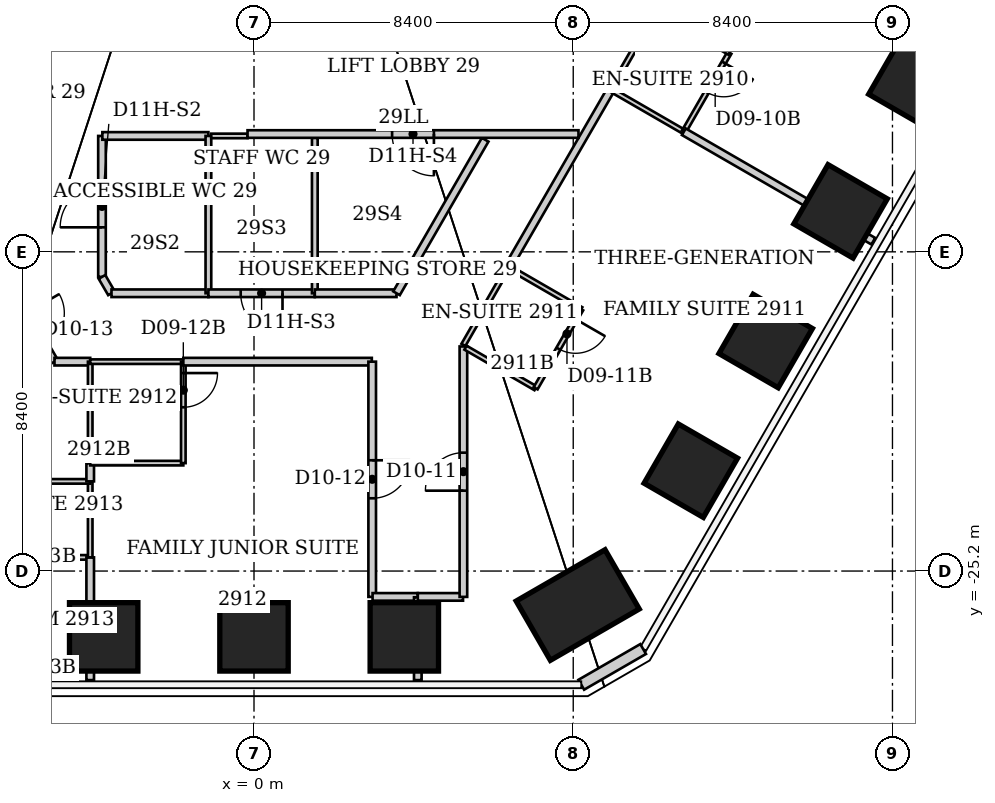
"""IFC4 building model, lengths in metres.
Left out: names, types, materials, properties, quantities, classifications, styles, units other than length and angle.
Written with IfcOpenShell. Run it as: python <this file> out.ifc"""

import sys

from ifc_helpers import new_model, si_unit, direction, frame, frame_2d, origin, origin_2d, place, context, subcontext, project, spatial, rectangle, extrude, element, fill, save


model = new_model("IFC4")
c1 = context("Model", 3, precision=1e-05, world=origin(), true_north=direction((0.0, 1.0)))
c2 = subcontext(c1, "Body", "Model", "MODEL_VIEW")
j1 = project(units=[si_unit("LENGTHUNIT", "METRE"), si_unit("PLANEANGLEUNIT", "RADIAN")], contexts=[c1])
p1 = place(None, origin())
s1 = spatial("IfcSite", under=j1, at=p1, CompositionType="ELEMENT")
p2 = place(p1, origin())
s2 = spatial("IfcBuilding", under=s1, at=p2, CompositionType="ELEMENT")
p3 = place(p2, frame((0.0, 0.0, 119.6)))
s3 = spatial("IfcBuildingStorey", under=s2, at=p3, CompositionType="ELEMENT", Elevation=119.6)
for number, where, z_axis, x_axis in (
    (1, (17.404, -12.323, 0.0), (0.0, 0.0, 1.0), (0.866, -0.5, 0.0)),
    (2, (15.434, -15.735, 0.0), (0.0, 0.0, 1.0), (0.866, -0.5, 0.0)),
    (3, (13.464, -19.147, 0.0), (0.0, 0.0, 1.0), (0.866, -0.5, 0.0)),
    (4, (11.494, -22.559, 0.0), (0.0, 0.0, 1.0), (0.866, -0.5, 0.0)),
):
    element("IfcColumn", number, at=place(p3, frame(where, z_axis=z_axis, x_axis=x_axis)), inside=s3, PredefinedType="COLUMN", context=c2, shape_type="SweptSolid", body=[
        extrude(rectangle(XDim=1.8, YDim=1.8, at=origin_2d()), origin(), (0.0, 0.0, 1.0), 3.8),
    ])
p4 = place(p3, frame((8.518, -26.094, 0.0), z_axis=(0.0, 0.0, 1.0), x_axis=(0.5, -0.866025403784, 0.0)))
e5 = element("IfcColumn", 5, at=p4, inside=s3, PredefinedType="COLUMN", context=c2, shape_type="SweptSolid", body=[
    extrude(rectangle(XDim=1.8, YDim=2.7, at=origin_2d()), origin(), (0.0, 0.0, 1.0), 3.8),
])
for number, where, z_axis, x_axis in (
    (6, (3.955, -26.932, 0.0), (0.0, 0.0, 1.0), (0.0, -1.0, 0.0)),
    (7, (0.0, -26.932, 0.0), (0.0, 0.0, 1.0), (0.0, -1.0, 0.0)),
    (8, (-3.955, -26.932, 0.0), (0.0, 0.0, 1.0), (0.0, -1.0, 0.0)),
):
    element("IfcColumn", number, at=place(p3, frame(where, z_axis=z_axis, x_axis=x_axis)), inside=s3, PredefinedType="COLUMN", context=c2, shape_type="SweptSolid", body=[
        extrude(rectangle(XDim=1.8, YDim=1.8, at=origin_2d()), origin(), (0.0, 0.0, 1.0), 3.8),
    ])
p5 = place(p3, frame((10.24, -27.252, 0.0), z_axis=(0.0, 0.0, 1.0), x_axis=(-0.866045024864, -0.499966013754, 0.0)))
e9 = element("IfcWall", 9, at=p5, inside=s3, PredefinedType="SOLIDWALL", context=c2, shape_type="SweptSolid", body=[
    extrude(rectangle(XDim=1.88, YDim=0.3, at=frame_2d((0.94, 0.0))), origin(), (0.0, 0.0, 1.0), 3.64),
])
p6 = place(p3, frame((-6.71, -24.84, 0.0), z_axis=(0.0, 0.0, 1.0), x_axis=(1.0, 0.0, 0.0)))
e10 = element("IfcWall", 10, at=p6, inside=s3, PredefinedType="PARTITIONING", context=c2, shape_type="SweptSolid", body=[
    extrude(rectangle(XDim=2.4, YDim=0.12, at=frame_2d((1.2, 0.0))), origin(), (0.0, 0.0, 1.0), 3.64),
])
p7 = place(p6, frame((0.45, 0.0, 0.0)))
e11 = element("IfcOpeningElement", 11, at=p7, cuts=e10, PredefinedType="OPENING", context=c2, shape_type="SweptSolid", body=[
    extrude(rectangle(XDim=0.9, YDim=2.03, at=frame_2d((0.45, 1.015))), frame((0.0, 0.06, 0.0), z_axis=(0.0, -1.0, 0.0), x_axis=(1.0, 0.0, 0.0)), (0.0, 0.0, 1.0), 0.12),
])
p8 = place(p3, frame((-6.23, -18.0, 0.0), z_axis=(0.0, 0.0, 1.0), x_axis=(0.501647016168, -0.86507240805, 0.0)))
e12 = element("IfcWall", 12, at=p8, inside=s3, PredefinedType="PARTITIONING", context=c2, shape_type="SweptSolid", body=[
    extrude(rectangle(XDim=1.954, YDim=0.2, at=frame_2d((0.977, 0.0))), origin(), (0.0, 0.0, 1.0), 3.64),
])
p9 = place(p8, frame((0.477, 0.0, 0.0)))
e13 = element("IfcOpeningElement", 13, at=p9, cuts=e12, PredefinedType="OPENING", context=c2, shape_type="SweptSolid", body=[
    extrude(rectangle(XDim=1.0, YDim=2.13, at=frame_2d((0.5, 1.065))), frame((0.0, 0.1, 0.0), z_axis=(0.0, -1.0, 0.0), x_axis=(1.0, 0.0, 0.0)), (0.0, 0.0, 1.0), 0.2),
])
p10 = place(p3, frame((-5.25, -19.69, 0.0), z_axis=(0.0, 0.0, 1.0), x_axis=(1.0, 0.0, 0.0)))
e14 = element("IfcWall", 14, at=p10, inside=s3, PredefinedType="PARTITIONING", context=c2, shape_type="SweptSolid", body=[
    extrude(rectangle(XDim=0.94, YDim=0.2, at=frame_2d((0.47, 0.0))), origin(), (0.0, 0.0, 1.0), 3.64),
])
p11 = place(p3, frame((-4.31, -28.07, 0.0), z_axis=(0.0, 0.0, 1.0), x_axis=(0.0, 1.0, 0.0)))
e15 = element("IfcWall", 15, at=p11, inside=s3, PredefinedType="PARTITIONING", context=c2, shape_type="SweptSolid", body=[
    extrude(rectangle(XDim=3.23, YDim=0.2, at=frame_2d((1.615, 0.0))), origin(), (0.0, 0.0, 1.0), 3.64),
])
p12 = place(p3, frame((-4.31, -24.84, 0.0), z_axis=(0.0, 0.0, 1.0), x_axis=(0.0, 1.0, 0.0)))
e16 = element("IfcWall", 16, at=p12, inside=s3, PredefinedType="PARTITIONING", context=c2, shape_type="SweptSolid", body=[
    extrude(rectangle(XDim=2.0, YDim=0.12, at=frame_2d((1.0, 0.0))), origin(), (0.0, 0.0, 1.0), 3.64),
])
p13 = place(p3, frame((-4.31, -22.84, 0.0), z_axis=(0.0, 0.0, 1.0), x_axis=(-1.0, 0.0, 0.0)))
e17 = element("IfcWall", 17, at=p13, inside=s3, PredefinedType="PARTITIONING", context=c2, shape_type="SweptSolid", body=[
    extrude(rectangle(XDim=2.4, YDim=0.12, at=frame_2d((1.2, 0.0))), origin(), (0.0, 0.0, 1.0), 3.64),
])
p14 = place(p3, frame((-4.31, -22.84, 0.0), z_axis=(0.0, 0.0, 1.0), x_axis=(0.0, 1.0, 0.0)))
e18 = element("IfcWall", 18, at=p14, inside=s3, PredefinedType="PARTITIONING", context=c2, shape_type="SweptSolid", body=[
    extrude(rectangle(XDim=0.48, YDim=0.2, at=frame_2d((0.24, 0.0))), origin(), (0.0, 0.0, 1.0), 3.64),
])
p15 = place(p3, frame((-4.31, -22.36, 0.0), z_axis=(0.0, 0.0, 1.0), x_axis=(0.0, 1.0, 0.0)))
e19 = element("IfcWall", 19, at=p15, inside=s3, PredefinedType="PARTITIONING", context=c2, shape_type="SweptSolid", body=[
    extrude(rectangle(XDim=2.67, YDim=0.12, at=frame_2d((1.335, 0.0))), origin(), (0.0, 0.0, 1.0), 3.64),
])
for number, where, z_axis, x_axis in (
    (20, (-4.31, -22.36, 0.0), (0.0, 0.0, 1.0), (1.0, 0.0, 0.0)),
    (21, (-4.31, -19.69, 0.0), (0.0, 0.0, 1.0), (1.0, 0.0, 0.0)),
):
    element("IfcWall", number, at=place(p3, frame(where, z_axis=z_axis, x_axis=x_axis)), inside=s3, PredefinedType="PARTITIONING", context=c2, shape_type="SweptSolid", body=[
        extrude(rectangle(XDim=2.45, YDim=0.12, at=frame_2d((1.225, 0.0))), origin(), (0.0, 0.0, 1.0), 3.64),
    ])
p16 = place(p3, frame((-4.0, -17.46, 0.0), z_axis=(0.0, 0.0, 1.0), x_axis=(0.0, 1.0, 0.0)))
e22 = element("IfcWall", 22, at=p16, inside=s3, PredefinedType="PARTITIONING", context=c2, shape_type="SweptSolid", body=[
    extrude(rectangle(XDim=3.71, YDim=0.2, at=frame_2d((1.855, 0.0))), origin(), (0.0, 0.0, 1.0), 2.878),
])
p17 = place(p16, frame((1.305, 0.0, 0.0)))
e23 = element("IfcOpeningElement", 23, at=p17, cuts=e22, PredefinedType="OPENING", context=c2, shape_type="SweptSolid", body=[
    extrude(rectangle(XDim=1.1, YDim=2.2, at=frame_2d((0.55, 1.1))), frame((0.0, 0.1, 0.0), z_axis=(0.0, -1.0, 0.0), x_axis=(1.0, 0.0, 0.0)), (0.0, 0.0, 1.0), 0.2),
])
p18 = place(p3, frame((-3.99, -13.75, 0.0), z_axis=(0.0, 0.0, 1.0), x_axis=(1.0, 0.0, 0.0)))
e24 = element("IfcWall", 24, at=p18, inside=s3, PredefinedType="PARTITIONING", context=c2, shape_type="SweptSolid", body=[
    extrude(rectangle(XDim=2.79, YDim=0.2, at=frame_2d((1.395, 0.0))), origin(), (0.0, 0.0, 1.0), 3.64),
])
p19 = place(p3, frame((-3.75, -17.89, 0.0), z_axis=(0.0, 0.0, 1.0), x_axis=(-0.502680181512, 0.864472460588, 0.0)))
e25 = element("IfcWall", 25, at=p19, inside=s3, PredefinedType="PARTITIONING", context=c2, shape_type="SweptSolid", body=[
    extrude(rectangle(XDim=0.497, YDim=0.2, at=frame_2d((0.249, 0.0))), origin(), (0.0, 0.0, 1.0), 3.64),
])
p20 = place(p3, frame((-1.86, -22.36, 0.0), z_axis=(0.0, 0.0, 1.0), x_axis=(0.0, 1.0, 0.0)))
e26 = element("IfcWall", 26, at=p20, inside=s3, PredefinedType="PARTITIONING", context=c2, shape_type="SweptSolid", body=[
    extrude(rectangle(XDim=2.67, YDim=0.12, at=frame_2d((1.335, 0.0))), origin(), (0.0, 0.0, 1.0), 2.86),
])
p21 = place(p20, frame((1.47, 0.0, 0.0)))
e27 = element("IfcOpeningElement", 27, at=p21, cuts=e26, PredefinedType="OPENING", context=c2, shape_type="SweptSolid", body=[
    extrude(rectangle(XDim=0.9, YDim=2.03, at=frame_2d((0.45, 1.015))), frame((0.0, 0.06, 0.0), z_axis=(0.0, -1.0, 0.0), x_axis=(1.0, 0.0, 0.0)), (0.0, 0.0, 1.0), 0.12),
])
p22 = place(p3, frame((-1.86, -19.69, 0.0), z_axis=(0.0, 0.0, 1.0), x_axis=(1.0, 0.0, 0.0)))
e28 = element("IfcWall", 28, at=p22, inside=s3, PredefinedType="PARTITIONING", context=c2, shape_type="SweptSolid", body=[
    extrude(rectangle(XDim=4.96, YDim=0.2, at=frame_2d((2.48, 0.0))), origin(), (0.0, 0.0, 1.0), 3.64),
])
p23 = place(p3, frame((-1.2, -17.89, 0.0), z_axis=(0.0, 0.0, 1.0), x_axis=(-1.0, 0.0, 0.0)))
e29 = element("IfcWall", 29, at=p23, inside=s3, PredefinedType="PARTITIONING", context=c2, shape_type="SweptSolid", body=[
    extrude(rectangle(XDim=2.55, YDim=0.2, at=frame_2d((1.275, 0.0))), origin(), (0.0, 0.0, 1.0), 3.64),
])
p24 = place(p3, frame((-1.2, -13.75, 0.0), z_axis=(0.0, 0.0, 1.0), x_axis=(0.0, -1.0, 0.0)))
e30 = element("IfcWall", 30, at=p24, inside=s3, PredefinedType="PARTITIONING", context=c2, shape_type="SweptSolid", body=[
    extrude(rectangle(XDim=4.14, YDim=0.15, at=frame_2d((2.07, 0.0))), origin(), (0.0, 0.0, 1.0), 3.64),
])
p25 = place(p3, frame((-1.125, -13.75, 0.0), z_axis=(0.0, 0.0, 1.0), x_axis=(1.0, 0.0, 0.0)))
e31 = element("IfcWall", 31, at=p25, inside=s3, PredefinedType="PARTITIONING", context=c2, shape_type="SweptSolid", body=[
    extrude(rectangle(XDim=0.955, YDim=0.12, at=frame_2d((0.478, 0.0))), origin(), (0.0, 0.0, 1.0), 3.64),
])
p26 = place(p3, frame((1.6, -17.89, 0.0), z_axis=(0.0, 0.0, 1.0), x_axis=(-1.0, 0.0, 0.0)))
e32 = element("IfcWall", 32, at=p26, inside=s3, PredefinedType="PARTITIONING", context=c2, shape_type="SweptSolid", body=[
    extrude(rectangle(XDim=2.8, YDim=0.2, at=frame_2d((1.4, 0.0))), origin(), (0.0, 0.0, 1.0), 3.64),
])
p27 = place(p26, frame((0.85, 0.0, 0.0)))
e33 = element("IfcOpeningElement", 33, at=p27, cuts=e32, PredefinedType="OPENING", context=c2, shape_type="SweptSolid", body=[
    extrude(rectangle(XDim=1.1, YDim=2.2, at=frame_2d((0.55, 1.1))), frame((0.0, 0.1, 0.0), z_axis=(0.0, -1.0, 0.0), x_axis=(1.0, 0.0, 0.0)), (0.0, 0.0, 1.0), 0.2),
])
p28 = place(p3, frame((1.6, -13.8, 0.0), z_axis=(0.0, 0.0, 1.0), x_axis=(0.0, -1.0, 0.0)))
e34 = element("IfcWall", 34, at=p28, inside=s3, PredefinedType="PARTITIONING", context=c2, shape_type="SweptSolid", body=[
    extrude(rectangle(XDim=4.09, YDim=0.15, at=frame_2d((2.045, 0.0))), origin(), (0.0, 0.0, 1.0), 3.64),
])
p29 = place(p3, frame((3.11, -19.69, 0.0), z_axis=(0.0, 0.0, 1.0), x_axis=(0.0, -1.0, 0.0)))
e35 = element("IfcWall", 35, at=p29, inside=s3, PredefinedType="PARTITIONING", context=c2, shape_type="SweptSolid", body=[
    extrude(rectangle(XDim=6.19, YDim=0.2, at=frame_2d((3.095, 0.0))), origin(), (0.0, 0.0, 1.0), 3.64),
])
p30 = place(p29, frame((2.595, 0.0, 0.0)))
e36 = element("IfcOpeningElement", 36, at=p30, cuts=e35, PredefinedType="OPENING", context=c2, shape_type="SweptSolid", body=[
    extrude(rectangle(XDim=1.0, YDim=2.13, at=frame_2d((0.5, 1.065))), frame((0.0, 0.1, 0.0), z_axis=(0.0, -1.0, 0.0), x_axis=(1.0, 0.0, 0.0)), (0.0, 0.0, 1.0), 0.2),
])
p31 = place(p3, frame((3.12, -25.88, 0.0), z_axis=(0.0, 0.0, 1.0), x_axis=(1.0, 0.0, 0.0)))
e37 = element("IfcWall", 37, at=p31, inside=s3, PredefinedType="PARTITIONING", context=c2, shape_type="SweptSolid", body=[
    extrude(rectangle(XDim=1.19, YDim=0.2, at=frame_2d((0.595, 0.0))), origin(), (0.0, 0.0, 1.0), 3.64),
])
p32 = place(p3, frame((3.75, -17.89, 0.0), z_axis=(0.0, 0.0, 1.0), x_axis=(-1.0, 0.0, 0.0)))
e38 = element("IfcWall", 38, at=p32, inside=s3, PredefinedType="PARTITIONING", context=c2, shape_type="SweptSolid", body=[
    extrude(rectangle(XDim=2.15, YDim=0.2, at=frame_2d((1.075, 0.0))), origin(), (0.0, 0.0, 1.0), 3.64),
])
p33 = place(p3, frame((4.31, -28.07, 0.0), z_axis=(0.0, 0.0, 1.0), x_axis=(0.0, 1.0, 0.0)))
e39 = element("IfcWall", 39, at=p33, inside=s3, PredefinedType="PARTITIONING", context=c2, shape_type="SweptSolid", body=[
    extrude(rectangle(XDim=2.18, YDim=0.2, at=frame_2d((1.09, 0.0))), origin(), (0.0, 0.0, 1.0), 3.64),
])
p34 = place(p3, frame((4.31, -25.88, 0.0), z_axis=(0.0, 0.0, 1.0), x_axis=(1.0, 0.0, 0.0)))
e40 = element("IfcWall", 40, at=p34, inside=s3, PredefinedType="PARTITIONING", context=c2, shape_type="SweptSolid", body=[
    extrude(rectangle(XDim=1.19, YDim=0.2, at=frame_2d((0.595, 0.0))), origin(), (0.0, 0.0, 1.0), 3.64),
])
p35 = place(p3, frame((5.51, -25.88, 0.0), z_axis=(0.0, 0.0, 1.0), x_axis=(0.0, 1.0, 0.0)))
e41 = element("IfcWall", 41, at=p35, inside=s3, PredefinedType="PARTITIONING", context=c2, shape_type="SweptSolid", body=[
    extrude(rectangle(XDim=6.59, YDim=0.2, at=frame_2d((3.295, 0.0))), origin(), (0.0, 0.0, 1.0), 3.64),
])
p36 = place(p35, frame((2.795, 0.0, 0.0)))
e42 = element("IfcOpeningElement", 42, at=p36, cuts=e41, PredefinedType="OPENING", context=c2, shape_type="SweptSolid", body=[
    extrude(rectangle(XDim=1.0, YDim=2.13, at=frame_2d((0.5, 1.065))), frame((0.0, 0.1, 0.0), z_axis=(0.0, -1.0, 0.0), x_axis=(1.0, 0.0, 0.0)), (0.0, 0.0, 1.0), 0.2),
])
p37 = place(p3, frame((5.51, -19.25, 0.0), z_axis=(0.0, 0.0, 1.0), x_axis=(0.498837591974, 0.866695481028, 0.0)))
e43 = element("IfcWall", 43, at=p37, inside=s3, PredefinedType="PARTITIONING", context=c2, shape_type="SweptSolid", body=[
    extrude(rectangle(XDim=2.365, YDim=0.12, at=frame_2d((1.183, 0.0))), origin(), (0.0, 0.0, 1.0), 3.64),
])
p38 = place(p3, frame((5.566, -19.323, 0.0), z_axis=(0.0, 0.0, 1.0), x_axis=(0.865436746432, -0.501018201192, 0.0)))
e44 = element("IfcWall", 44, at=p38, inside=s3, PredefinedType="PARTITIONING", context=c2, shape_type="SweptSolid", body=[
    extrude(rectangle(XDim=2.13, YDim=0.12, at=frame_2d((1.065, 0.0))), origin(), (0.0, 0.0, 1.0), 3.64),
])
p39 = place(p3, frame((6.083, -13.85, 0.0), z_axis=(0.0, 0.0, 1.0), x_axis=(-0.499977643516, -0.866038310922, 0.0)))
e45 = element("IfcWall", 45, at=p39, inside=s3, PredefinedType="PARTITIONING", context=c2, shape_type="SweptSolid", body=[
    extrude(rectangle(XDim=4.665, YDim=0.2, at=frame_2d((2.333, 0.0))), origin(), (0.0, 0.0, 1.0), 3.64),
])
p40 = place(p3, frame((6.69, -17.2, 0.0), z_axis=(0.0, 0.0, 1.0), x_axis=(0.500524150216, 0.865722573952, 0.0)))
e46 = element("IfcWall", 46, at=p40, inside=s3, PredefinedType="PARTITIONING", context=c2, shape_type="SweptSolid", body=[
    extrude(rectangle(XDim=5.394, YDim=0.2, at=frame_2d((2.697, 0.0))), origin(), (0.0, 0.0, 1.0), 3.64),
])
p41 = place(p3, frame((7.41, -20.39, 0.0), z_axis=(0.0, 0.0, 1.0), x_axis=(0.499737123639, 0.866177122335, 0.0)))
e47 = element("IfcWall", 47, at=p41, inside=s3, PredefinedType="PARTITIONING", context=c2, shape_type="SweptSolid", body=[
    extrude(rectangle(XDim=2.401, YDim=0.12, at=frame_2d((1.201, 0.0))), origin(), (0.0, 0.0, 1.0), 3.64),
])
p42 = place(p41, frame((1.201, 0.0, 0.0)))
e48 = element("IfcOpeningElement", 48, at=p42, cuts=e47, PredefinedType="OPENING", context=c2, shape_type="SweptSolid", body=[
    extrude(rectangle(XDim=0.9, YDim=2.03, at=frame_2d((0.45, 1.015))), frame((0.0, 0.06, 0.0), z_axis=(0.0, -1.0, 0.0), x_axis=(1.0, 0.0, 0.0)), (0.0, 0.0, 1.0), 0.12),
])
p43 = place(p3, frame((8.538, -13.7, 0.0), z_axis=(0.0, 0.0, 1.0), x_axis=(-1.0, 0.0, 0.0)))
e49 = element("IfcWall", 49, at=p43, inside=s3, PredefinedType="PARTITIONING", context=c2, shape_type="SweptSolid", body=[
    extrude(rectangle(XDim=8.708, YDim=0.2, at=frame_2d((4.354, 0.0))), origin(), (0.0, 0.0, 1.0), 3.64),
])
p44 = place(p43, frame((3.804, 0.0, 0.0)))
e50 = element("IfcOpeningElement", 50, at=p44, cuts=e49, PredefinedType="OPENING", context=c2, shape_type="SweptSolid", body=[
    extrude(rectangle(XDim=1.1, YDim=2.2, at=frame_2d((0.55, 1.1))), frame((0.0, 0.1, 0.0), z_axis=(0.0, -1.0, 0.0), x_axis=(1.0, 0.0, 0.0)), (0.0, 0.0, 1.0), 0.2),
])
p45 = place(p3, frame((8.61, -18.31, 0.0), z_axis=(0.0, 0.0, 1.0), x_axis=(-0.865732595383, 0.500506816428, 0.0)))
e51 = element("IfcWall", 51, at=p45, inside=s3, PredefinedType="PARTITIONING", context=c2, shape_type="SweptSolid", body=[
    extrude(rectangle(XDim=2.218, YDim=0.12, at=frame_2d((1.109, 0.0))), origin(), (0.0, 0.0, 1.0), 3.64),
])
p46 = place(p3, frame((9.39, -12.53, 0.0), z_axis=(0.0, 0.0, 1.0), x_axis=(0.499769390944, 0.866158505053, 0.0)))
e52 = element("IfcWall", 52, at=p46, inside=s3, PredefinedType="PARTITIONING", context=c2, shape_type="SweptSolid", body=[
    extrude(rectangle(XDim=2.402, YDim=0.12, at=frame_2d((1.201, 0.0))), origin(), (0.0, 0.0, 1.0), 3.64),
])
p47 = place(p3, frame((9.39, -12.53, 0.0), z_axis=(0.0, 0.0, 1.0), x_axis=(0.865732595383, -0.500506816428, 0.0)))
e53 = element("IfcWall", 53, at=p47, inside=s3, PredefinedType="PARTITIONING", context=c2, shape_type="SweptSolid", body=[
    extrude(rectangle(XDim=2.218, YDim=0.12, at=frame_2d((1.109, 0.0))), origin(), (0.0, 0.0, 1.0), 3.64),
])
p48 = place(p3, frame((11.31, -13.64, 0.0), z_axis=(0.0, 0.0, 1.0), x_axis=(0.499737123639, 0.866177122335, 0.0)))
e54 = element("IfcWall", 54, at=p48, inside=s3, PredefinedType="PARTITIONING", context=c2, shape_type="SweptSolid", body=[
    extrude(rectangle(XDim=2.401, YDim=0.12, at=frame_2d((1.201, 0.0))), origin(), (0.0, 0.0, 1.0), 3.64),
])
p49 = place(p48, frame((1.201, 0.0, 0.0)))
e55 = element("IfcOpeningElement", 55, at=p49, cuts=e54, PredefinedType="OPENING", context=c2, shape_type="SweptSolid", body=[
    extrude(rectangle(XDim=0.9, YDim=2.03, at=frame_2d((0.45, 1.015))), frame((0.0, 0.06, 0.0), z_axis=(0.0, -1.0, 0.0), x_axis=(1.0, 0.0, 0.0)), (0.0, 0.0, 1.0), 0.12),
])
p50 = place(p3, frame((11.31, -13.64, 0.0), z_axis=(0.0, 0.0, 1.0), x_axis=(0.865919350456, -0.50018364478, 0.0)))
e56 = element("IfcWall", 56, at=p50, inside=s3, PredefinedType="PARTITIONING", context=c2, shape_type="SweptSolid", body=[
    extrude(rectangle(XDim=5.758, YDim=0.2, at=frame_2d((2.879, 0.0))), origin(), (0.0, 0.0, 1.0), 3.64),
])
p51 = place(p3, frame((12.51, -11.56, 0.0), z_axis=(0.0, 0.0, 1.0), x_axis=(-0.865705017107, 0.500554515868, 0.0)))
e57 = element("IfcWall", 57, at=p51, inside=s3, PredefinedType="PARTITIONING", context=c2, shape_type="SweptSolid", body=[
    extrude(rectangle(XDim=2.218, YDim=0.12, at=frame_2d((1.109, 0.0))), origin(), (0.0, 0.0, 1.0), 3.64),
])
p52 = place(p49, origin())
e58 = element("IfcDoor", 58, at=p52, inside=s3, OperationType="SINGLE_SWING_RIGHT", PredefinedType="DOOR", context=c2, shape_type="SweptSolid", body=[
    extrude(rectangle(XDim=0.9, YDim=2.03, at=frame_2d((0.45, 1.015))), frame((0.0, 0.025, 0.0), z_axis=(0.0, -1.0, 0.0), x_axis=(1.0, 0.0, 0.0)), (0.0, 0.0, 1.0), 0.05),
])
fill(e55, e58)
p53 = place(p36, origin())
e59 = element("IfcDoor", 59, at=p53, inside=s3, OperationType="SINGLE_SWING_LEFT", PredefinedType="DOOR", context=c2, shape_type="SweptSolid", body=[
    extrude(rectangle(XDim=1.0, YDim=2.13, at=frame_2d((0.5, 1.065))), frame((0.0, 0.025, 0.0), z_axis=(0.0, -1.0, 0.0), x_axis=(1.0, 0.0, 0.0)), (0.0, 0.0, 1.0), 0.05),
])
fill(e42, e59)
p54 = place(p42, origin())
e60 = element("IfcDoor", 60, at=p54, inside=s3, OperationType="SINGLE_SWING_RIGHT", PredefinedType="DOOR", context=c2, shape_type="SweptSolid", body=[
    extrude(rectangle(XDim=0.9, YDim=2.03, at=frame_2d((0.45, 1.015))), frame((0.0, 0.025, 0.0), z_axis=(0.0, -1.0, 0.0), x_axis=(1.0, 0.0, 0.0)), (0.0, 0.0, 1.0), 0.05),
])
fill(e48, e60)
p55 = place(p30, origin())
e61 = element("IfcDoor", 61, at=p55, inside=s3, OperationType="SINGLE_SWING_LEFT", PredefinedType="DOOR", context=c2, shape_type="SweptSolid", body=[
    extrude(rectangle(XDim=1.0, YDim=2.13, at=frame_2d((0.5, 1.065))), frame((0.0, 0.025, 0.0), z_axis=(0.0, -1.0, 0.0), x_axis=(1.0, 0.0, 0.0)), (0.0, 0.0, 1.0), 0.05),
])
fill(e36, e61)
p56 = place(p21, origin())
e62 = element("IfcDoor", 62, at=p56, inside=s3, OperationType="SINGLE_SWING_RIGHT", PredefinedType="DOOR", context=c2, shape_type="SweptSolid", body=[
    extrude(rectangle(XDim=0.9, YDim=2.03, at=frame_2d((0.45, 1.015))), frame((0.0, 0.025, 0.0), z_axis=(0.0, -1.0, 0.0), x_axis=(1.0, 0.0, 0.0)), (0.0, 0.0, 1.0), 0.05),
])
fill(e27, e62)
p57 = place(p17, origin())
e63 = element("IfcDoor", 63, at=p57, inside=s3, OperationType="SINGLE_SWING_LEFT", PredefinedType="DOOR", context=c2, shape_type="SweptSolid", body=[
    extrude(rectangle(XDim=1.1, YDim=2.2, at=frame_2d((0.55, 1.1))), frame((0.0, 0.025, 0.0), z_axis=(0.0, -1.0, 0.0), x_axis=(1.0, 0.0, 0.0)), (0.0, 0.0, 1.0), 0.05),
])
fill(e23, e63)
p58 = place(p27, origin())
e64 = element("IfcDoor", 64, at=p58, inside=s3, OperationType="SINGLE_SWING_LEFT", PredefinedType="DOOR", context=c2, shape_type="SweptSolid", body=[
    extrude(rectangle(XDim=1.1, YDim=2.2, at=frame_2d((0.55, 1.1))), frame((0.0, 0.025, 0.0), z_axis=(0.0, -1.0, 0.0), x_axis=(1.0, 0.0, 0.0)), (0.0, 0.0, 1.0), 0.05),
])
fill(e33, e64)
p59 = place(p44, origin())
e65 = element("IfcDoor", 65, at=p59, inside=s3, OperationType="SINGLE_SWING_LEFT", PredefinedType="DOOR", context=c2, shape_type="SweptSolid", body=[
    extrude(rectangle(XDim=1.1, YDim=2.2, at=frame_2d((0.55, 1.1))), frame((0.0, 0.025, 0.0), z_axis=(0.0, -1.0, 0.0), x_axis=(1.0, 0.0, 0.0)), (0.0, 0.0, 1.0), 0.05),
])
fill(e50, e65)
save(model, sys.argv[1])
